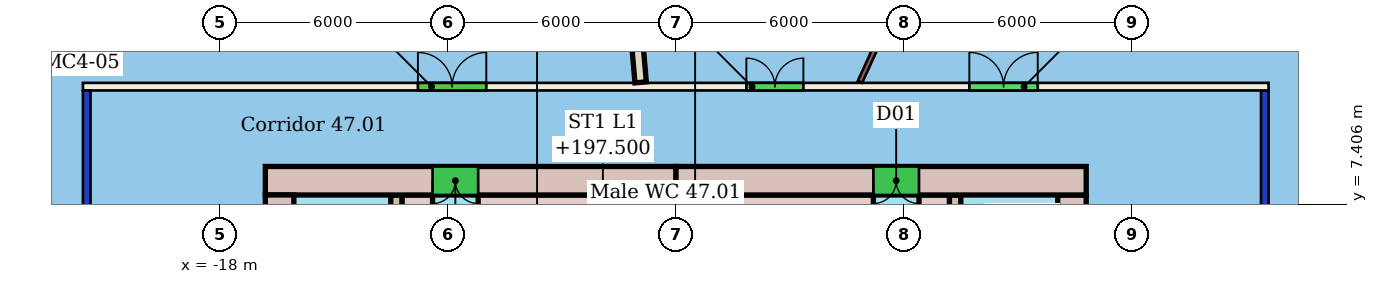
"""IFC4 building model, lengths in metres.
Left out: names, types, materials, properties, quantities, classifications, styles, units other than length and angle.
Written with IfcOpenShell. Run it as: python <this file> out.ifc"""

import sys

from ifc_helpers import new_model, si_unit, direction, frame, frame_2d, origin, place, context, subcontext, project, spatial, rectangle, extrude, element, fill, save


model = new_model("IFC4")
c1 = context("Model", 3, precision=1e-05, world=origin(), true_north=direction((0.0, 1.0)))
c2 = subcontext(c1, "Body", "Model", "MODEL_VIEW")
j1 = project(units=[si_unit("LENGTHUNIT", "METRE"), si_unit("PLANEANGLEUNIT", "RADIAN")], contexts=[c1])
p1 = place(None, origin())
s1 = spatial("IfcSite", under=j1, at=p1, CompositionType="ELEMENT")
p2 = place(p1, origin())
s2 = spatial("IfcBuilding", under=s1, at=p2, CompositionType="ELEMENT")
p3 = place(p2, frame((0.0, 0.0, 195.7)))
s3 = spatial("IfcBuildingStorey", under=s2, at=p3, CompositionType="ELEMENT", Elevation=195.7)
p4 = place(p3, frame((-21.5, -10.4, 0.0), z_axis=(0.0, 0.0, 1.0), x_axis=(0.0, 1.0, 0.0)))
e1 = element("IfcWall", 1, at=p4, inside=s3, PredefinedType="PARTITIONING", context=c2, shape_type="SweptSolid", body=[
    extrude(rectangle(XDim=20.8, YDim=0.2, at=frame_2d((10.4, 0.0))), origin(), (0.0, 0.0, 1.0), 3.05),
])
p5 = place(p4, frame((11.02, 0.0, 0.0)))
e2 = element("IfcOpeningElement", 2, at=p5, cuts=e1, PredefinedType="OPENING", context=c2, shape_type="SweptSolid", body=[
    extrude(rectangle(XDim=1.8, YDim=2.4, at=frame_2d((0.9, 1.2))), frame((0.0, 0.11, 0.0), z_axis=(0.0, -1.0, 0.0), x_axis=(1.0, 0.0, 0.0)), (0.0, 0.0, 1.0), 0.22),
])
p6 = place(p3, frame((-21.6, 10.5, 0.0), z_axis=(0.0, 0.0, 1.0), x_axis=(1.0, 0.0, 0.0)))
e3 = element("IfcWall", 3, at=p6, inside=s3, PredefinedType="PARTITIONING", context=c2, shape_type="SweptSolid", body=[
    extrude(rectangle(XDim=31.2, YDim=0.2, at=frame_2d((15.6, 0.0))), origin(), (0.0, 0.0, 1.0), 3.45),
])
p7 = place(p6, frame((17.458, 0.0, 0.0)))
e4 = element("IfcOpeningElement", 4, at=p7, cuts=e3, PredefinedType="OPENING", context=c2, shape_type="SweptSolid", body=[
    extrude(rectangle(XDim=1.5, YDim=2.1, at=frame_2d((0.75, 1.05))), frame((0.0, 0.11, 0.0), z_axis=(0.0, -1.0, 0.0), x_axis=(1.0, 0.0, 0.0)), (0.0, 0.0, 1.0), 0.22),
])
p8 = place(p6, frame((8.814, 0.0, 0.0)))
e5 = element("IfcOpeningElement", 5, at=p8, cuts=e3, PredefinedType="OPENING", context=c2, shape_type="SweptSolid", body=[
    extrude(rectangle(XDim=1.8, YDim=2.4, at=frame_2d((0.9, 1.2))), frame((0.0, 0.11, 0.0), z_axis=(0.0, -1.0, 0.0), x_axis=(1.0, 0.0, 0.0)), (0.0, 0.0, 1.0), 0.22),
])
p9 = place(p6, frame((23.325, 0.0, 0.0)))
e6 = element("IfcOpeningElement", 6, at=p9, cuts=e3, PredefinedType="OPENING", context=c2, shape_type="SweptSolid", body=[
    extrude(rectangle(XDim=1.8, YDim=2.1, at=frame_2d((0.9, 1.05))), frame((0.0, 0.11, 0.0), z_axis=(0.0, -1.0, 0.0), x_axis=(1.0, 0.0, 0.0)), (0.0, 0.0, 1.0), 0.22),
])
p10 = place(p3, frame((9.5, 10.4, 0.0), z_axis=(0.0, 0.0, 1.0), x_axis=(0.0, -1.0, 0.0)))
e7 = element("IfcWall", 7, at=p10, inside=s3, PredefinedType="PARTITIONING", context=c2, shape_type="SweptSolid", body=[
    extrude(rectangle(XDim=20.8, YDim=0.2, at=frame_2d((10.4, 0.0))), origin(), (0.0, 0.0, 1.0), 3.05),
])
p11 = place(p10, frame((10.281, 0.0, 0.0)))
e8 = element("IfcOpeningElement", 8, at=p11, cuts=e7, PredefinedType="OPENING", context=c2, shape_type="SweptSolid", body=[
    extrude(rectangle(XDim=1.8, YDim=2.4, at=frame_2d((0.9, 1.2))), frame((0.0, 0.11, 0.0), z_axis=(0.0, -1.0, 0.0), x_axis=(1.0, 0.0, 0.0)), (0.0, 0.0, 1.0), 0.22),
])
p12 = place(p3, frame((4.811, 23.699, 0.0), z_axis=(0.0, 0.0, 1.0), x_axis=(-0.415026400379, -0.909809368488, 0.0)))
e9 = element("IfcWall", 9, at=p12, inside=s3, PredefinedType="PARTITIONING", context=c2, shape_type="SweptSolid", body=[
    extrude(rectangle(XDim=14.369, YDim=0.125, at=frame_2d((7.184, 0.0))), origin(), (0.0, 0.0, 1.0), 3.45),
])
p13 = place(p3, frame((-8.044, 23.474, 0.0), z_axis=(0.0, 0.0, 1.0), x_axis=(0.086744678296, -0.996230576115, 0.0)))
e10 = element("IfcWall", 10, at=p13, inside=s3, PredefinedType="PARTITIONING", context=c2, shape_type="SweptSolid", body=[
    extrude(rectangle(XDim=12.91, YDim=0.3, at=frame_2d((6.455, 0.0))), origin(), (0.0, 0.0, 1.0), 3.45),
])
p14 = place(p3, frame((-27.229, 8.887, 0.0), z_axis=(0.0, 0.0, 1.0), x_axis=(0.922430941615, -0.386162087667, 0.0)))
e11 = element("IfcWall", 11, at=p14, inside=s3, PredefinedType="PARTITIONING", context=c2, shape_type="SweptSolid", body=[
    extrude(rectangle(XDim=6.039, YDim=0.3, at=frame_2d((3.02, 0.0))), origin(), (0.0, 0.0, 1.0), 3.45),
])
p15 = place(p3, frame((4.8, 8.025, 0.0), z_axis=(0.0, 0.0, 1.0), x_axis=(-1.0, 0.0, 0.0)))
e12 = element("IfcWall", 12, at=p15, inside=s3, PredefinedType="SHEAR", context=c2, shape_type="SweptSolid", body=[
    extrude(rectangle(XDim=10.8, YDim=0.75, at=frame_2d((5.4, 0.0))), origin(), (0.0, 0.0, 1.0), 3.3),
])
p16 = place(p15, frame((4.4, 0.0, 0.0)))
e13 = element("IfcOpeningElement", 13, at=p16, cuts=e12, PredefinedType="OPENING", context=c2, shape_type="SweptSolid", body=[
    extrude(rectangle(XDim=1.2, YDim=2.1, at=frame_2d((0.6, 1.05))), frame((0.0, 0.385, 0.0), z_axis=(0.0, -1.0, 0.0), x_axis=(1.0, 0.0, 0.0)), (0.0, 0.0, 1.0), 0.77),
])
p17 = place(p3, frame((-6.0, 8.025, 0.0), z_axis=(0.0, 0.0, 1.0), x_axis=(-1.0, 0.0, 0.0)))
e14 = element("IfcWall", 14, at=p17, inside=s3, PredefinedType="SHEAR", context=c2, shape_type="SweptSolid", body=[
    extrude(rectangle(XDim=10.8, YDim=0.75, at=frame_2d((5.4, 0.0))), origin(), (0.0, 0.0, 1.0), 3.3),
])
p18 = place(p17, frame((5.2, 0.0, 0.0)))
e15 = element("IfcOpeningElement", 15, at=p18, cuts=e14, PredefinedType="OPENING", context=c2, shape_type="SweptSolid", body=[
    extrude(rectangle(XDim=1.2, YDim=2.1, at=frame_2d((0.6, 1.05))), frame((0.0, 0.385, 0.0), z_axis=(0.0, -1.0, 0.0), x_axis=(1.0, 0.0, 0.0)), (0.0, 0.0, 1.0), 0.77),
])
p19 = place(p3, frame((-16.425, 7.65, 0.0), z_axis=(0.0, 0.0, 1.0), x_axis=(0.0, -1.0, 0.0)))
e16 = element("IfcWall", 16, at=p19, inside=s3, PredefinedType="SHEAR", context=c2, shape_type="SweptSolid", body=[
    extrude(rectangle(XDim=15.3, YDim=0.75, at=frame_2d((7.65, 0.0))), origin(), (0.0, 0.0, 1.0), 3.3),
])
p20 = place(p19, frame((11.25, 0.0, 0.0)))
e17 = element("IfcOpeningElement", 17, at=p20, cuts=e16, PredefinedType="OPENING", context=c2, shape_type="SweptSolid", body=[
    extrude(rectangle(XDim=1.2, YDim=2.1, at=frame_2d((0.6, 1.05))), frame((0.0, 0.385, 0.0), z_axis=(0.0, -1.0, 0.0), x_axis=(1.0, 0.0, 0.0)), (0.0, 0.0, 1.0), 0.77),
])
p21 = place(p19, frame((2.85, 0.0, 0.0)))
e18 = element("IfcOpeningElement", 18, at=p21, cuts=e16, PredefinedType="OPENING", context=c2, shape_type="SweptSolid", body=[
    extrude(rectangle(XDim=1.2, YDim=2.1, at=frame_2d((0.6, 1.05))), frame((0.0, 0.385, 0.0), z_axis=(0.0, -1.0, 0.0), x_axis=(1.0, 0.0, 0.0)), (0.0, 0.0, 1.0), 0.77),
])
p22 = place(p3, frame((4.425, -7.65, 0.0), z_axis=(0.0, 0.0, 1.0), x_axis=(0.0, 1.0, 0.0)))
e19 = element("IfcWall", 19, at=p22, inside=s3, PredefinedType="SHEAR", context=c2, shape_type="SweptSolid", body=[
    extrude(rectangle(XDim=15.3, YDim=0.75, at=frame_2d((7.65, 0.0))), origin(), (0.0, 0.0, 1.0), 3.3),
])
p23 = place(p22, frame((2.85, 0.0, 0.0)))
e20 = element("IfcOpeningElement", 20, at=p23, cuts=e19, PredefinedType="OPENING", context=c2, shape_type="SweptSolid", body=[
    extrude(rectangle(XDim=1.2, YDim=2.1, at=frame_2d((0.6, 1.05))), frame((0.0, 0.385, 0.0), z_axis=(0.0, -1.0, 0.0), x_axis=(1.0, 0.0, 0.0)), (0.0, 0.0, 1.0), 0.77),
])
p24 = place(p22, frame((11.25, 0.0, 0.0)))
e21 = element("IfcOpeningElement", 21, at=p24, cuts=e19, PredefinedType="OPENING", context=c2, shape_type="SweptSolid", body=[
    extrude(rectangle(XDim=1.2, YDim=2.1, at=frame_2d((0.6, 1.05))), frame((0.0, 0.385, 0.0), z_axis=(0.0, -1.0, 0.0), x_axis=(1.0, 0.0, 0.0)), (0.0, 0.0, 1.0), 0.77),
])
p25 = place(p3, frame((-13.35, 7.65, 0.0), z_axis=(0.0, 0.0, 1.0), x_axis=(0.0, -1.0, 0.0)))
e22 = element("IfcWall", 22, at=p25, inside=s3, PredefinedType="SHEAR", context=c2, shape_type="SweptSolid", body=[
    extrude(rectangle(XDim=15.3, YDim=0.3, at=frame_2d((7.65, 0.0))), origin(), (0.0, 0.0, 1.0), 3.3),
])
p26 = place(p25, frame((6.9, 0.0, 0.0)))
e23 = element("IfcOpeningElement", 23, at=p26, cuts=e22, PredefinedType="OPENING", context=c2, shape_type="SweptSolid", body=[
    extrude(rectangle(XDim=1.5, YDim=2.1, at=frame_2d((0.75, 1.05))), frame((0.0, 0.16, 0.0), z_axis=(0.0, -1.0, 0.0), x_axis=(1.0, 0.0, 0.0)), (0.0, 0.0, 1.0), 0.32),
])
p27 = place(p3, frame((1.35, -7.65, 0.0), z_axis=(0.0, 0.0, 1.0), x_axis=(0.0, 1.0, 0.0)))
e24 = element("IfcWall", 24, at=p27, inside=s3, PredefinedType="SHEAR", context=c2, shape_type="SweptSolid", body=[
    extrude(rectangle(XDim=15.3, YDim=0.3, at=frame_2d((7.65, 0.0))), origin(), (0.0, 0.0, 1.0), 3.3),
])
p28 = place(p27, frame((1.56, 0.0, 0.0)))
e25 = element("IfcOpeningElement", 25, at=p28, cuts=e24, PredefinedType="OPENING", context=c2, shape_type="SweptSolid", body=[
    extrude(rectangle(XDim=1.0, YDim=2.1, at=frame_2d((0.5, 1.05))), frame((0.0, 0.16, 0.0), z_axis=(0.0, -1.0, 0.0), x_axis=(1.0, 0.0, 0.0)), (0.0, 0.0, 1.0), 0.32),
])
p29 = place(p27, frame((6.9, 0.0, 0.0)))
e26 = element("IfcOpeningElement", 26, at=p29, cuts=e24, PredefinedType="OPENING", context=c2, shape_type="SweptSolid", body=[
    extrude(rectangle(XDim=1.5, YDim=2.1, at=frame_2d((0.75, 1.05))), frame((0.0, 0.16, 0.0), z_axis=(0.0, -1.0, 0.0), x_axis=(1.0, 0.0, 0.0)), (0.0, 0.0, 1.0), 0.32),
])
p30 = place(p3, frame((-6.0, 3.88, 0.0), z_axis=(0.0, 0.0, 1.0), x_axis=(0.0, 1.0, 0.0)))
e27 = element("IfcWall", 27, at=p30, inside=s3, PredefinedType="SHEAR", context=c2, shape_type="SweptSolid", body=[
    extrude(rectangle(XDim=3.77, YDim=0.3, at=frame_2d((1.885, 0.0))), origin(), (0.0, 0.0, 1.0), 3.3),
])
p31 = place(p3, frame((-13.2, 7.475, 0.0), z_axis=(0.0, 0.0, 1.0), x_axis=(1.0, 0.0, 0.0)))
e28 = element("IfcWall", 28, at=p31, inside=s3, PredefinedType="SHEAR", context=c2, shape_type="SweptSolid", body=[
    extrude(rectangle(XDim=0.8, YDim=0.35, at=frame_2d((0.4, 0.0))), origin(), (0.0, 0.0, 1.0), 3.3),
])
for number, where, z_axis, x_axis in (
    (29, (-11.2, 7.475, 0.0), (0.0, 0.0, 1.0), (1.0, 0.0, 0.0)),
    (30, (-5.85, 7.475, 0.0), (0.0, 0.0, 1.0), (1.0, 0.0, 0.0)),
):
    element("IfcWall", number, at=place(p3, frame(where, z_axis=z_axis, x_axis=x_axis)), inside=s3, PredefinedType="SHEAR", context=c2, shape_type="SweptSolid", body=[
        extrude(rectangle(XDim=5.05, YDim=0.35, at=frame_2d((2.525, 0.0))), origin(), (0.0, 0.0, 1.0), 3.3),
    ])
p32 = place(p3, frame((0.4, 7.475, 0.0), z_axis=(0.0, 0.0, 1.0), x_axis=(1.0, 0.0, 0.0)))
e31 = element("IfcWall", 31, at=p32, inside=s3, PredefinedType="SHEAR", context=c2, shape_type="SweptSolid", body=[
    extrude(rectangle(XDim=0.8, YDim=0.35, at=frame_2d((0.4, 0.0))), origin(), (0.0, 0.0, 1.0), 3.3),
])
p33 = place(p7, origin())
e32 = element("IfcDoor", 32, at=p33, inside=s3, OperationType="DOUBLE_DOOR_SINGLE_SWING", PredefinedType="DOOR", context=c2, shape_type="SweptSolid", body=[
    extrude(rectangle(XDim=1.5, YDim=2.1, at=frame_2d((0.75, 1.05))), frame((0.0, 0.025, 0.0), z_axis=(0.0, -1.0, 0.0), x_axis=(1.0, 0.0, 0.0)), (0.0, 0.0, 1.0), 0.05),
])
fill(e4, e32)
p34 = place(p8, origin())
e33 = element("IfcDoor", 33, at=p34, inside=s3, OperationType="DOUBLE_DOOR_SINGLE_SWING", PredefinedType="DOOR", context=c2, shape_type="SweptSolid", body=[
    extrude(rectangle(XDim=1.8, YDim=2.4, at=frame_2d((0.9, 1.2))), frame((0.0, 0.025, 0.0), z_axis=(0.0, -1.0, 0.0), x_axis=(1.0, 0.0, 0.0)), (0.0, 0.0, 1.0), 0.05),
])
fill(e5, e33)
p35 = place(p9, origin())
e34 = element("IfcDoor", 34, at=p35, inside=s3, OperationType="DOUBLE_DOOR_SINGLE_SWING", PredefinedType="DOOR", context=c2, shape_type="SweptSolid", body=[
    extrude(rectangle(XDim=1.8, YDim=2.1, at=frame_2d((0.9, 1.05))), frame((0.0, 0.025, 0.0), z_axis=(0.0, -1.0, 0.0), x_axis=(1.0, 0.0, 0.0)), (0.0, 0.0, 1.0), 0.05),
])
fill(e6, e34)
p36 = place(p16, origin())
e35 = element("IfcDoor", 35, at=p36, inside=s3, OperationType="DOUBLE_DOOR_SINGLE_SWING", PredefinedType="NOTDEFINED", context=c2, shape_type="SweptSolid", body=[
    extrude(rectangle(XDim=1.2, YDim=2.1, at=frame_2d((0.6, 1.05))), frame((0.0, 0.025, 0.0), z_axis=(0.0, -1.0, 0.0), x_axis=(1.0, 0.0, 0.0)), (0.0, 0.0, 1.0), 0.05),
])
fill(e13, e35)
p37 = place(p18, origin())
e36 = element("IfcDoor", 36, at=p37, inside=s3, OperationType="DOUBLE_DOOR_SINGLE_SWING", PredefinedType="NOTDEFINED", context=c2, shape_type="SweptSolid", body=[
    extrude(rectangle(XDim=1.2, YDim=2.1, at=frame_2d((0.6, 1.05))), frame((0.0, 0.025, 0.0), z_axis=(0.0, -1.0, 0.0), x_axis=(1.0, 0.0, 0.0)), (0.0, 0.0, 1.0), 0.05),
])
fill(e15, e36)
save(model, sys.argv[1])
